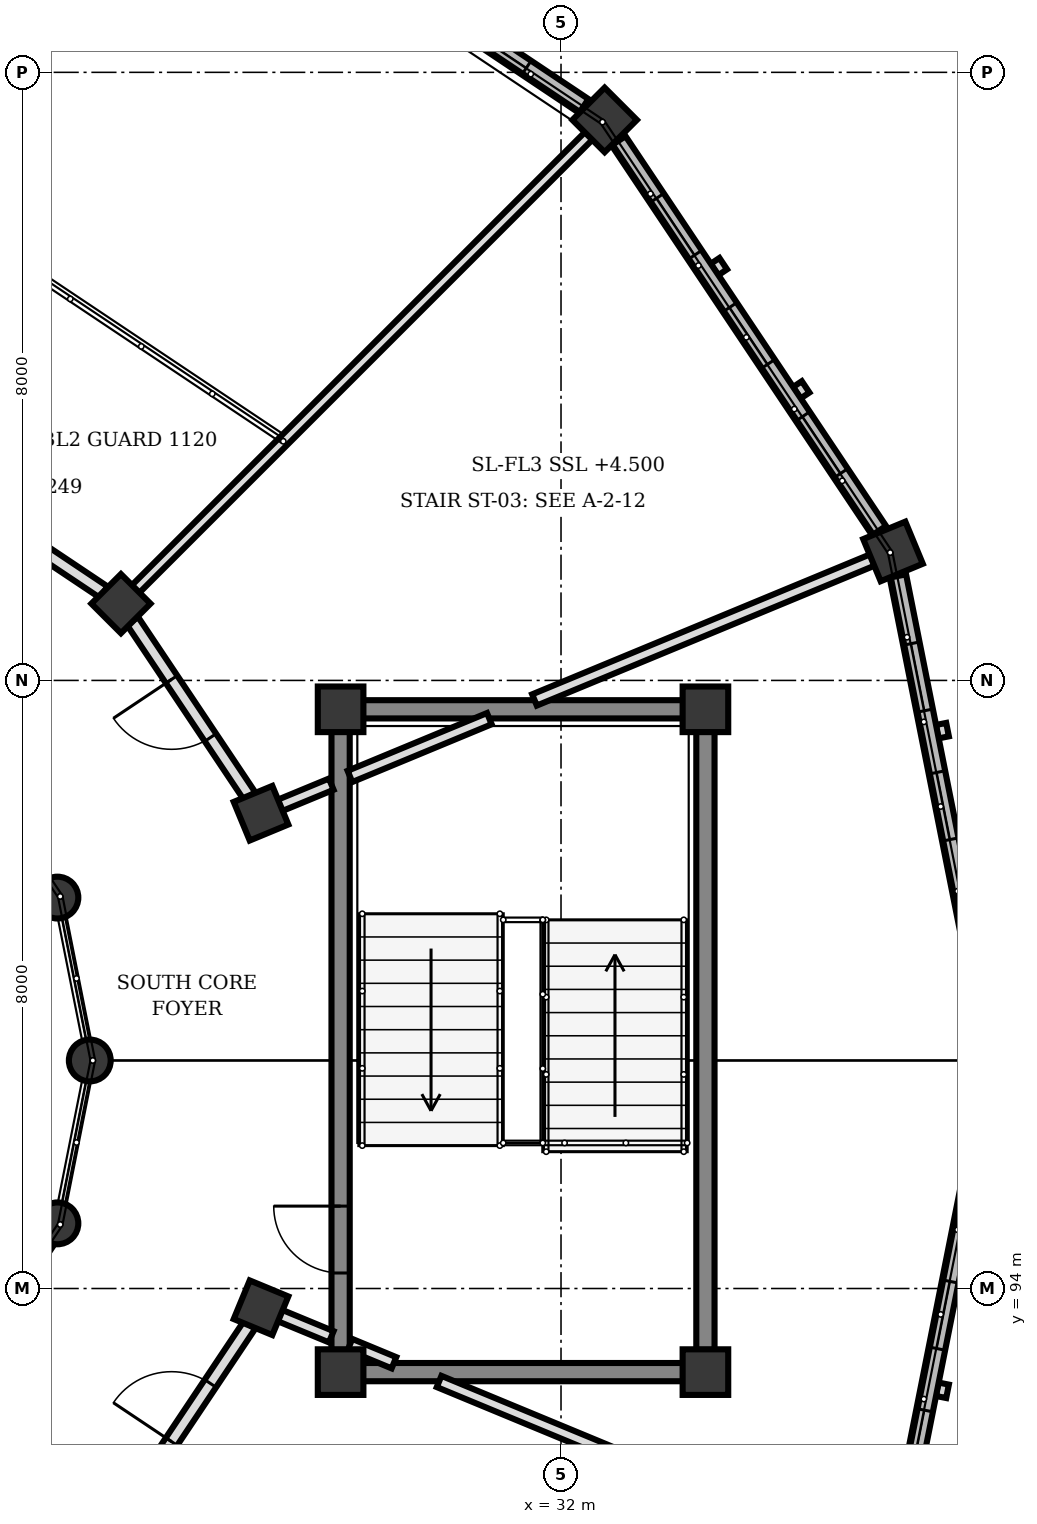
"""IFC4 building model, lengths in metres.
Left out: names, types, materials, properties, quantities, classifications, styles, units other than length and angle.
Written with IfcOpenShell. Run it as: python <this file> out.ifc"""

import sys

from ifc_helpers import new_model, si_unit, direction, frame, frame_2d, origin, origin_2d, place, context, subcontext, project, spatial, rectangle, circle, extrude, element, fill, save


model = new_model("IFC4")
c1 = context("Model", 3, precision=1e-05, world=origin(), true_north=direction((0.0, 1.0)))
c2 = subcontext(c1, "Body", "Model", "MODEL_VIEW")
j1 = project(units=[si_unit("LENGTHUNIT", "METRE"), si_unit("PLANEANGLEUNIT", "RADIAN")], contexts=[c1])
p1 = place(None, origin())
s1 = spatial("IfcSite", under=j1, at=p1, CompositionType="ELEMENT")
p2 = place(p1, origin())
s2 = spatial("IfcBuilding", under=s1, at=p2, CompositionType="ELEMENT")
p3 = place(p2, frame((0.0, 0.0, 4.5)))
s3 = spatial("IfcBuildingStorey", under=s2, at=p3, CompositionType="ELEMENT", Elevation=4.5)
for number, where, z_axis, x_axis in (
    (1, (29.1, 92.9, 0.0), (0.0, 0.0, 1.0), (1.0, 0.0, 0.0)),
    (2, (33.9, 92.9, 0.0), (0.0, 0.0, 1.0), (1.0, 0.0, 0.0)),
    (3, (33.9, 101.62, 0.0), (0.0, 0.0, 1.0), (1.0, 0.0, 0.0)),
    (4, (29.1, 101.62, 0.0), (0.0, 0.0, 1.0), (1.0, 0.0, 0.0)),
):
    element("IfcColumn", number, at=place(p3, frame(where, z_axis=z_axis, x_axis=x_axis)), inside=s3, PredefinedType="COLUMN", context=c2, shape_type="SweptSolid", body=[
        extrude(rectangle(XDim=0.6, YDim=0.6, at=origin_2d()), origin(), (0.0, 0.0, 1.0), 4.0),
    ])
for number, where, z_axis, x_axis in (
    (5, (25.8, 97.0, 0.0), (0.0, 0.0, 1.0), (1.0, 0.0, 0.0)),
    (6, (25.374, 99.143, 0.0), (0.0, 0.0, 1.0), (1.0, 0.0, 0.0)),
    (7, (25.374, 94.857, 0.0), (0.0, 0.0, 1.0), (1.0, 0.0, 0.0)),
):
    element("IfcColumn", number, at=place(p3, frame(where, z_axis=z_axis, x_axis=x_axis)), inside=s3, PredefinedType="COLUMN", context=c2, shape_type="SweptSolid", body=[
        extrude(circle(Radius=0.275, at=origin_2d()), origin(), (0.0, 0.0, 1.0), 4.0),
    ])
for number, where, z_axis, x_axis in (
    (8, (28.053, 100.253, 0.0), (0.0, 0.0, 1.0), (0.924, 0.383, 0.0)),
    (9, (26.21, 103.01, 0.0), (0.0, 0.0, 1.0), (0.707, 0.707, 0.0)),
    (10, (28.053, 93.747, 0.0), (0.0, 0.0, 1.0), (0.924, -0.383, 0.0)),
):
    element("IfcColumn", number, at=place(p3, frame(where, z_axis=z_axis, x_axis=x_axis)), inside=s3, PredefinedType="COLUMN", context=c2, shape_type="SweptSolid", body=[
        extrude(rectangle(XDim=0.55, YDim=0.55, at=origin_2d()), origin(), (0.0, 0.0, 1.0), 4.0),
    ])
for number, where, z_axis, x_axis in (
    (11, (36.368, 103.697, 0.0), (0.0, 0.0, 1.0), (0.924, 0.383, 0.0)),
    (12, (32.574, 109.374, 0.0), (0.0, 0.0, 1.0), (0.707, 0.707, 0.0)),
):
    element("IfcColumn", number, at=place(p3, frame(where, z_axis=z_axis, x_axis=x_axis)), inside=s3, PredefinedType="COLUMN", context=c2, shape_type="SweptSolid", body=[
        extrude(rectangle(XDim=0.6, YDim=0.6, at=origin_2d()), origin(), (0.0, 0.0, 1.0), 4.0),
    ])
p4 = place(p3, frame((36.432, 103.374, 0.0), z_axis=(0.0, 0.0, 1.0), x_axis=(0.195164813773, -0.980770460131, 0.0)))
e13 = element("IfcWall", 13, at=p4, inside=s3, PredefinedType="SOLIDWALL", context=c2, shape_type="SweptSolid", body=[
    extrude(rectangle(XDim=6.17, YDim=0.22, at=frame_2d((3.085, 0.0))), origin(), (0.0, 0.0, 1.0), 3.172),
])
p5 = place(p4, frame((0.907, 0.0, 0.85)))
e14 = element("IfcOpeningElement", 14, at=p5, cuts=e13, PredefinedType="OPENING", context=c2, shape_type="SweptSolid", body=[
    extrude(rectangle(XDim=0.9, YDim=1.4, at=frame_2d((0.45, 0.7))), frame((0.0, 0.12, 0.0), z_axis=(0.0, -1.0, 0.0), x_axis=(1.0, 0.0, 0.0)), (0.0, 0.0, 1.0), 0.24),
])
p6 = place(p4, frame((2.635, 0.0, 0.85)))
e15 = element("IfcOpeningElement", 15, at=p6, cuts=e13, PredefinedType="OPENING", context=c2, shape_type="SweptSolid", body=[
    extrude(rectangle(XDim=0.9, YDim=1.4, at=frame_2d((0.45, 0.7))), frame((0.0, 0.12, 0.0), z_axis=(0.0, -1.0, 0.0), x_axis=(1.0, 0.0, 0.0)), (0.0, 0.0, 1.0), 0.24),
])
p7 = place(p4, frame((4.362, 0.0, 0.85)))
e16 = element("IfcOpeningElement", 16, at=p7, cuts=e13, PredefinedType="OPENING", context=c2, shape_type="SweptSolid", body=[
    extrude(rectangle(XDim=0.9, YDim=1.4, at=frame_2d((0.45, 0.7))), frame((0.0, 0.12, 0.0), z_axis=(0.0, -1.0, 0.0), x_axis=(1.0, 0.0, 0.0)), (0.0, 0.0, 1.0), 0.24),
])
p8 = place(p3, frame((32.757, 109.1, 0.0), z_axis=(0.0, 0.0, 1.0), x_axis=(0.555658736667, -0.831410469242, 0.0)))
e17 = element("IfcWall", 17, at=p8, inside=s3, PredefinedType="SOLIDWALL", context=c2, shape_type="SweptSolid", body=[
    extrude(rectangle(XDim=6.169, YDim=0.22, at=frame_2d((3.084, 0.0))), origin(), (0.0, 0.0, 1.0), 3.172),
])
p9 = place(p8, frame((0.907, 0.0, 0.85)))
e18 = element("IfcOpeningElement", 18, at=p9, cuts=e17, PredefinedType="OPENING", context=c2, shape_type="SweptSolid", body=[
    extrude(rectangle(XDim=0.9, YDim=1.4, at=frame_2d((0.45, 0.7))), frame((0.0, 0.12, 0.0), z_axis=(0.0, -1.0, 0.0), x_axis=(1.0, 0.0, 0.0)), (0.0, 0.0, 1.0), 0.24),
])
p10 = place(p8, frame((2.635, 0.0, 0.85)))
e19 = element("IfcOpeningElement", 19, at=p10, cuts=e17, PredefinedType="OPENING", context=c2, shape_type="SweptSolid", body=[
    extrude(rectangle(XDim=0.9, YDim=1.4, at=frame_2d((0.45, 0.7))), frame((0.0, 0.12, 0.0), z_axis=(0.0, -1.0, 0.0), x_axis=(1.0, 0.0, 0.0)), (0.0, 0.0, 1.0), 0.24),
])
p11 = place(p8, frame((4.362, 0.0, 0.85)))
e20 = element("IfcOpeningElement", 20, at=p11, cuts=e17, PredefinedType="OPENING", context=c2, shape_type="SweptSolid", body=[
    extrude(rectangle(XDim=0.9, YDim=1.4, at=frame_2d((0.45, 0.7))), frame((0.0, 0.12, 0.0), z_axis=(0.0, -1.0, 0.0), x_axis=(1.0, 0.0, 0.0)), (0.0, 0.0, 1.0), 0.24),
])
p12 = place(p3, frame((27.171, 112.985, 0.0), z_axis=(0.0, 0.0, 1.0), x_axis=(0.831392186772, -0.55568609104, 0.0)))
e21 = element("IfcWall", 21, at=p12, inside=s3, PredefinedType="SOLIDWALL", context=c2, shape_type="SweptSolid", body=[
    extrude(rectangle(XDim=6.169, YDim=0.22, at=frame_2d((3.085, 0.0))), origin(), (0.0, 0.0, 1.0), 3.172),
])
p13 = place(p12, frame((0.907, 0.0, 0.85)))
e22 = element("IfcOpeningElement", 22, at=p13, cuts=e21, PredefinedType="OPENING", context=c2, shape_type="SweptSolid", body=[
    extrude(rectangle(XDim=0.9, YDim=1.4, at=frame_2d((0.45, 0.7))), frame((0.0, 0.12, 0.0), z_axis=(0.0, -1.0, 0.0), x_axis=(1.0, 0.0, 0.0)), (0.0, 0.0, 1.0), 0.24),
])
p14 = place(p12, frame((2.635, 0.0, 0.85)))
e23 = element("IfcOpeningElement", 23, at=p14, cuts=e21, PredefinedType="OPENING", context=c2, shape_type="SweptSolid", body=[
    extrude(rectangle(XDim=0.9, YDim=1.4, at=frame_2d((0.45, 0.7))), frame((0.0, 0.12, 0.0), z_axis=(0.0, -1.0, 0.0), x_axis=(1.0, 0.0, 0.0)), (0.0, 0.0, 1.0), 0.24),
])
p15 = place(p12, frame((4.362, 0.0, 0.85)))
e24 = element("IfcOpeningElement", 24, at=p15, cuts=e21, PredefinedType="OPENING", context=c2, shape_type="SweptSolid", body=[
    extrude(rectangle(XDim=0.9, YDim=1.4, at=frame_2d((0.45, 0.7))), frame((0.0, 0.12, 0.0), z_axis=(0.0, -1.0, 0.0), x_axis=(1.0, 0.0, 0.0)), (0.0, 0.0, 1.0), 0.24),
])
p16 = place(p3, frame((24.314, 93.27, 0.0), z_axis=(0.0, 0.0, 1.0), x_axis=(0.555287078904, 0.83165874011, 0.0)))
e25 = element("IfcWall", 25, at=p16, inside=s3, PredefinedType="SOLIDWALL", context=c2, shape_type="SweptSolid", body=[
    extrude(rectangle(XDim=1.632, YDim=0.24, at=frame_2d((0.816, 0.0))), origin(), (0.0, 0.0, 1.0), 3.222),
])
p17 = place(p3, frame((37.636, 96.677, 0.0), z_axis=(0.0, 0.0, 1.0), x_axis=(-0.195164813773, -0.980770460131, 0.0)))
e26 = element("IfcWall", 26, at=p17, inside=s3, PredefinedType="SOLIDWALL", context=c2, shape_type="SweptSolid", body=[
    extrude(rectangle(XDim=6.17, YDim=0.22, at=frame_2d((3.085, 0.0))), origin(), (0.0, 0.0, 1.0), 3.172),
])
p18 = place(p17, frame((0.907, 0.0, 0.85)))
e27 = element("IfcOpeningElement", 27, at=p18, cuts=e26, PredefinedType="OPENING", context=c2, shape_type="SweptSolid", body=[
    extrude(rectangle(XDim=0.9, YDim=1.4, at=frame_2d((0.45, 0.7))), frame((0.0, 0.12, 0.0), z_axis=(0.0, -1.0, 0.0), x_axis=(1.0, 0.0, 0.0)), (0.0, 0.0, 1.0), 0.24),
])
p19 = place(p17, frame((2.635, 0.0, 0.85)))
e28 = element("IfcOpeningElement", 28, at=p19, cuts=e26, PredefinedType="OPENING", context=c2, shape_type="SweptSolid", body=[
    extrude(rectangle(XDim=0.9, YDim=1.4, at=frame_2d((0.45, 0.7))), frame((0.0, 0.12, 0.0), z_axis=(0.0, -1.0, 0.0), x_axis=(1.0, 0.0, 0.0)), (0.0, 0.0, 1.0), 0.24),
])
p20 = place(p17, frame((4.362, 0.0, 0.85)))
e29 = element("IfcOpeningElement", 29, at=p20, cuts=e26, PredefinedType="OPENING", context=c2, shape_type="SweptSolid", body=[
    extrude(rectangle(XDim=0.9, YDim=1.4, at=frame_2d((0.45, 0.7))), frame((0.0, 0.12, 0.0), z_axis=(0.0, -1.0, 0.0), x_axis=(1.0, 0.0, 0.0)), (0.0, 0.0, 1.0), 0.24),
])
p21 = place(p3, frame((29.1, 93.192, 0.0), z_axis=(0.0, 0.0, 1.0), x_axis=(0.0, 1.0, 0.0)))
e30 = element("IfcWall", 30, at=p21, inside=s3, PredefinedType="SHEAR", context=c2, shape_type="SweptSolid", body=[
    extrude(rectangle(XDim=8.136, YDim=0.24, at=frame_2d((4.068, 0.0))), origin(), (0.0, 0.0, 1.0), 3.74),
])
p22 = place(p21, frame((1.012, 0.0, 0.0)))
e31 = element("IfcOpeningElement", 31, at=p22, cuts=e30, PredefinedType="OPENING", context=c2, shape_type="SweptSolid", body=[
    extrude(rectangle(XDim=0.88, YDim=2.1, at=frame_2d((0.44, 1.05))), frame((0.0, 0.13, 0.0), z_axis=(0.0, -1.0, 0.0), x_axis=(1.0, 0.0, 0.0)), (0.0, 0.0, 1.0), 0.26),
])
p23 = place(p3, frame((33.9, 101.328, 0.0), z_axis=(0.0, 0.0, 1.0), x_axis=(0.0, -1.0, 0.0)))
e32 = element("IfcWall", 32, at=p23, inside=s3, PredefinedType="SHEAR", context=c2, shape_type="SweptSolid", body=[
    extrude(rectangle(XDim=8.136, YDim=0.24, at=frame_2d((4.068, 0.0))), origin(), (0.0, 0.0, 1.0), 3.74),
])
for number, where, z_axis, x_axis in (
    (33, (33.608, 92.9, 0.0), (0.0, 0.0, 1.0), (-1.0, 0.0, 0.0)),
    (34, (33.608, 101.62, 0.0), (0.0, 0.0, 1.0), (-1.0, 0.0, 0.0)),
):
    element("IfcWall", number, at=place(p3, frame(where, z_axis=z_axis, x_axis=x_axis)), inside=s3, PredefinedType="SHEAR", context=c2, shape_type="SweptSolid", body=[
        extrude(rectangle(XDim=4.216, YDim=0.24, at=frame_2d((2.108, 0.0))), origin(), (0.0, 0.0, 1.0), 3.74),
    ])
p24 = place(p3, frame((28.3, 100.355, 0.0), z_axis=(0.0, 0.0, 1.0), x_axis=(0.924069600435, 0.382224245113, 0.0)))
e35 = element("IfcWall", 35, at=p24, inside=s3, PredefinedType="PARTITIONING", context=c2, shape_type="SweptSolid", body=[
    extrude(rectangle(XDim=0.733, YDim=0.16, at=frame_2d((0.366, 0.0))), origin(), (0.0, 0.0, 1.0), 3.7),
])
p25 = place(p3, frame((29.223, 100.737, 0.0), z_axis=(0.0, 0.0, 1.0), x_axis=(0.923817443679, 0.382833293686, 0.0)))
e36 = element("IfcWall", 36, at=p25, inside=s3, PredefinedType="PARTITIONING", context=c2, shape_type="SweptSolid", body=[
    extrude(rectangle(XDim=1.985, YDim=0.16, at=frame_2d((0.993, 0.0))), origin(), (0.0, 0.0, 1.0), 3.7),
])
p26 = place(p3, frame((31.651, 101.743, 0.0), z_axis=(0.0, 0.0, 1.0), x_axis=(0.923877739946, 0.382687759972, 0.0)))
e37 = element("IfcWall", 37, at=p26, inside=s3, PredefinedType="PARTITIONING", context=c2, shape_type="SweptSolid", body=[
    extrude(rectangle(XDim=4.813, YDim=0.16, at=frame_2d((2.407, 0.0))), origin(), (0.0, 0.0, 1.0), 3.7),
])
p27 = place(p3, frame((26.399, 103.199, 0.0), z_axis=(0.0, 0.0, 1.0), x_axis=(0.707106781187, 0.707106781187, 0.0)))
e38 = element("IfcWall", 38, at=p27, inside=s3, PredefinedType="PARTITIONING", context=c2, shape_type="SweptSolid", body=[
    extrude(rectangle(XDim=8.441, YDim=0.14, at=frame_2d((4.221, 0.0))), origin(), (0.0, 0.0, 1.0), 3.072),
])
p28 = place(p3, frame((28.3, 93.645, 0.0), z_axis=(0.0, 0.0, 1.0), x_axis=(0.924069600435, -0.382224245113, 0.0)))
e39 = element("IfcWall", 39, at=p28, inside=s3, PredefinedType="PARTITIONING", context=c2, shape_type="SweptSolid", body=[
    extrude(rectangle(XDim=0.733, YDim=0.16, at=frame_2d((0.366, 0.0))), origin(), (0.0, 0.0, 1.0), 3.072),
])
p29 = place(p3, frame((29.223, 93.263, 0.0), z_axis=(0.0, 0.0, 1.0), x_axis=(0.923812676193, -0.382844797933, 0.0)))
e40 = element("IfcWall", 40, at=p29, inside=s3, PredefinedType="PARTITIONING", context=c2, shape_type="SweptSolid", body=[
    extrude(rectangle(XDim=0.627, YDim=0.16, at=frame_2d((0.313, 0.0))), origin(), (0.0, 0.0, 1.0), 3.072),
])
p30 = place(p3, frame((30.396, 92.777, 0.0), z_axis=(0.0, 0.0, 1.0), x_axis=(0.923864955254, -0.382718623082, 0.0)))
e41 = element("IfcWall", 41, at=p30, inside=s3, PredefinedType="PARTITIONING", context=c2, shape_type="SweptSolid", body=[
    extrude(rectangle(XDim=6.172, YDim=0.16, at=frame_2d((3.086, 0.0))), origin(), (0.0, 0.0, 1.0), 3.072),
])
p31 = place(p3, frame((27.902, 100.479, 0.0), z_axis=(0.0, 0.0, 1.0), x_axis=(-0.555797002478, 0.831318045056, 0.0)))
e42 = element("IfcWall", 42, at=p31, inside=s3, PredefinedType="PARTITIONING", context=c2, shape_type="SweptSolid", body=[
    extrude(rectangle(XDim=2.773, YDim=0.18, at=frame_2d((1.386, 0.0))), origin(), (0.0, 0.0, 1.0), 3.072),
])
p32 = place(p31, frame((0.926, 0.0, 0.0)))
e43 = element("IfcOpeningElement", 43, at=p32, cuts=e42, PredefinedType="OPENING", context=c2, shape_type="SweptSolid", body=[
    extrude(rectangle(XDim=0.92, YDim=2.1, at=frame_2d((0.46, 1.05))), frame((0.0, 0.1, 0.0), z_axis=(0.0, -1.0, 0.0), x_axis=(1.0, 0.0, 0.0)), (0.0, 0.0, 1.0), 0.2),
])
p33 = place(p3, frame((25.984, 103.161, 0.0), z_axis=(0.0, 0.0, 1.0), x_axis=(-0.831318045056, 0.555797002478, 0.0)))
e44 = element("IfcWall", 44, at=p33, inside=s3, PredefinedType="PARTITIONING", context=c2, shape_type="SweptSolid", body=[
    extrude(rectangle(XDim=2.773, YDim=0.18, at=frame_2d((1.386, 0.0))), origin(), (0.0, 0.0, 1.0), 3.072),
])
p34 = place(p33, frame((0.926, 0.0, 0.0)))
e45 = element("IfcOpeningElement", 45, at=p34, cuts=e44, PredefinedType="OPENING", context=c2, shape_type="SweptSolid", body=[
    extrude(rectangle(XDim=0.92, YDim=2.1, at=frame_2d((0.46, 1.05))), frame((0.0, 0.1, 0.0), z_axis=(0.0, -1.0, 0.0), x_axis=(1.0, 0.0, 0.0)), (0.0, 0.0, 1.0), 0.2),
])
p35 = place(p3, frame((26.361, 91.216, 0.0), z_axis=(0.0, 0.0, 1.0), x_axis=(0.555797002478, 0.831318045056, 0.0)))
e46 = element("IfcWall", 46, at=p35, inside=s3, PredefinedType="PARTITIONING", context=c2, shape_type="SweptSolid", body=[
    extrude(rectangle(XDim=2.773, YDim=0.18, at=frame_2d((1.386, 0.0))), origin(), (0.0, 0.0, 1.0), 3.072),
])
p36 = place(p35, frame((0.926, 0.0, 0.0)))
e47 = element("IfcOpeningElement", 47, at=p36, cuts=e46, PredefinedType="OPENING", context=c2, shape_type="SweptSolid", body=[
    extrude(rectangle(XDim=0.92, YDim=2.1, at=frame_2d((0.46, 1.05))), frame((0.0, 0.1, 0.0), z_axis=(0.0, -1.0, 0.0), x_axis=(1.0, 0.0, 0.0)), (0.0, 0.0, 1.0), 0.2),
])
p37 = place(p5, origin())
e48 = element("IfcWindow", 48, at=p37, inside=s3, PartitioningType="SINGLE_PANEL", PredefinedType="WINDOW", context=c2, shape_type="SweptSolid", body=[
    extrude(rectangle(XDim=0.9, YDim=1.4, at=frame_2d((0.45, 0.7))), frame((0.0, 0.03, 0.0), z_axis=(0.0, -1.0, 0.0), x_axis=(1.0, 0.0, 0.0)), (0.0, 0.0, 1.0), 0.06),
])
fill(e14, e48)
p38 = place(p6, origin())
e49 = element("IfcWindow", 49, at=p38, inside=s3, PartitioningType="SINGLE_PANEL", PredefinedType="WINDOW", context=c2, shape_type="SweptSolid", body=[
    extrude(rectangle(XDim=0.9, YDim=1.4, at=frame_2d((0.45, 0.7))), frame((0.0, 0.03, 0.0), z_axis=(0.0, -1.0, 0.0), x_axis=(1.0, 0.0, 0.0)), (0.0, 0.0, 1.0), 0.06),
])
fill(e15, e49)
p39 = place(p9, origin())
e50 = element("IfcWindow", 50, at=p39, inside=s3, PartitioningType="SINGLE_PANEL", PredefinedType="WINDOW", context=c2, shape_type="SweptSolid", body=[
    extrude(rectangle(XDim=0.9, YDim=1.4, at=frame_2d((0.45, 0.7))), frame((0.0, 0.03, 0.0), z_axis=(0.0, -1.0, 0.0), x_axis=(1.0, 0.0, 0.0)), (0.0, 0.0, 1.0), 0.06),
])
fill(e18, e50)
p40 = place(p10, origin())
e51 = element("IfcWindow", 51, at=p40, inside=s3, PartitioningType="SINGLE_PANEL", PredefinedType="WINDOW", context=c2, shape_type="SweptSolid", body=[
    extrude(rectangle(XDim=0.9, YDim=1.4, at=frame_2d((0.45, 0.7))), frame((0.0, 0.03, 0.0), z_axis=(0.0, -1.0, 0.0), x_axis=(1.0, 0.0, 0.0)), (0.0, 0.0, 1.0), 0.06),
])
fill(e19, e51)
p41 = place(p11, origin())
e52 = element("IfcWindow", 52, at=p41, inside=s3, PartitioningType="SINGLE_PANEL", PredefinedType="WINDOW", context=c2, shape_type="SweptSolid", body=[
    extrude(rectangle(XDim=0.9, YDim=1.4, at=frame_2d((0.45, 0.7))), frame((0.0, 0.03, 0.0), z_axis=(0.0, -1.0, 0.0), x_axis=(1.0, 0.0, 0.0)), (0.0, 0.0, 1.0), 0.06),
])
fill(e20, e52)
p42 = place(p15, origin())
e53 = element("IfcWindow", 53, at=p42, inside=s3, PartitioningType="SINGLE_PANEL", PredefinedType="WINDOW", context=c2, shape_type="SweptSolid", body=[
    extrude(rectangle(XDim=0.9, YDim=1.4, at=frame_2d((0.45, 0.7))), frame((0.0, 0.03, 0.0), z_axis=(0.0, -1.0, 0.0), x_axis=(1.0, 0.0, 0.0)), (0.0, 0.0, 1.0), 0.06),
])
fill(e24, e53)
p43 = place(p19, origin())
e54 = element("IfcWindow", 54, at=p43, inside=s3, PartitioningType="SINGLE_PANEL", PredefinedType="WINDOW", context=c2, shape_type="SweptSolid", body=[
    extrude(rectangle(XDim=0.9, YDim=1.4, at=frame_2d((0.45, 0.7))), frame((0.0, 0.03, 0.0), z_axis=(0.0, -1.0, 0.0), x_axis=(1.0, 0.0, 0.0)), (0.0, 0.0, 1.0), 0.06),
])
fill(e28, e54)
p44 = place(p20, origin())
e55 = element("IfcWindow", 55, at=p44, inside=s3, PartitioningType="SINGLE_PANEL", PredefinedType="WINDOW", context=c2, shape_type="SweptSolid", body=[
    extrude(rectangle(XDim=0.9, YDim=1.4, at=frame_2d((0.45, 0.7))), frame((0.0, 0.03, 0.0), z_axis=(0.0, -1.0, 0.0), x_axis=(1.0, 0.0, 0.0)), (0.0, 0.0, 1.0), 0.06),
])
fill(e29, e55)
p45 = place(p22, origin())
e56 = element("IfcDoor", 56, at=p45, inside=s3, OperationType="SINGLE_SWING_RIGHT", PredefinedType="DOOR", context=c2, shape_type="SweptSolid", body=[
    extrude(rectangle(XDim=0.88, YDim=2.1, at=frame_2d((0.44, 1.05))), frame((0.0, 0.025, 0.0), z_axis=(0.0, -1.0, 0.0), x_axis=(1.0, 0.0, 0.0)), (0.0, 0.0, 1.0), 0.05),
])
fill(e31, e56)
p46 = place(p32, origin())
e57 = element("IfcDoor", 57, at=p46, inside=s3, OperationType="SINGLE_SWING_RIGHT", PredefinedType="DOOR", context=c2, shape_type="SweptSolid", body=[
    extrude(rectangle(XDim=0.92, YDim=2.1, at=frame_2d((0.46, 1.05))), frame((0.0, 0.025, 0.0), z_axis=(0.0, -1.0, 0.0), x_axis=(1.0, 0.0, 0.0)), (0.0, 0.0, 1.0), 0.05),
])
fill(e43, e57)
p47 = place(p36, origin())
e58 = element("IfcDoor", 58, at=p47, inside=s3, OperationType="SINGLE_SWING_LEFT", PredefinedType="DOOR", context=c2, shape_type="SweptSolid", body=[
    extrude(rectangle(XDim=0.92, YDim=2.1, at=frame_2d((0.46, 1.05))), frame((0.0, 0.025, 0.0), z_axis=(0.0, -1.0, 0.0), x_axis=(1.0, 0.0, 0.0)), (0.0, 0.0, 1.0), 0.05),
])
fill(e47, e58)
save(model, sys.argv[1])
